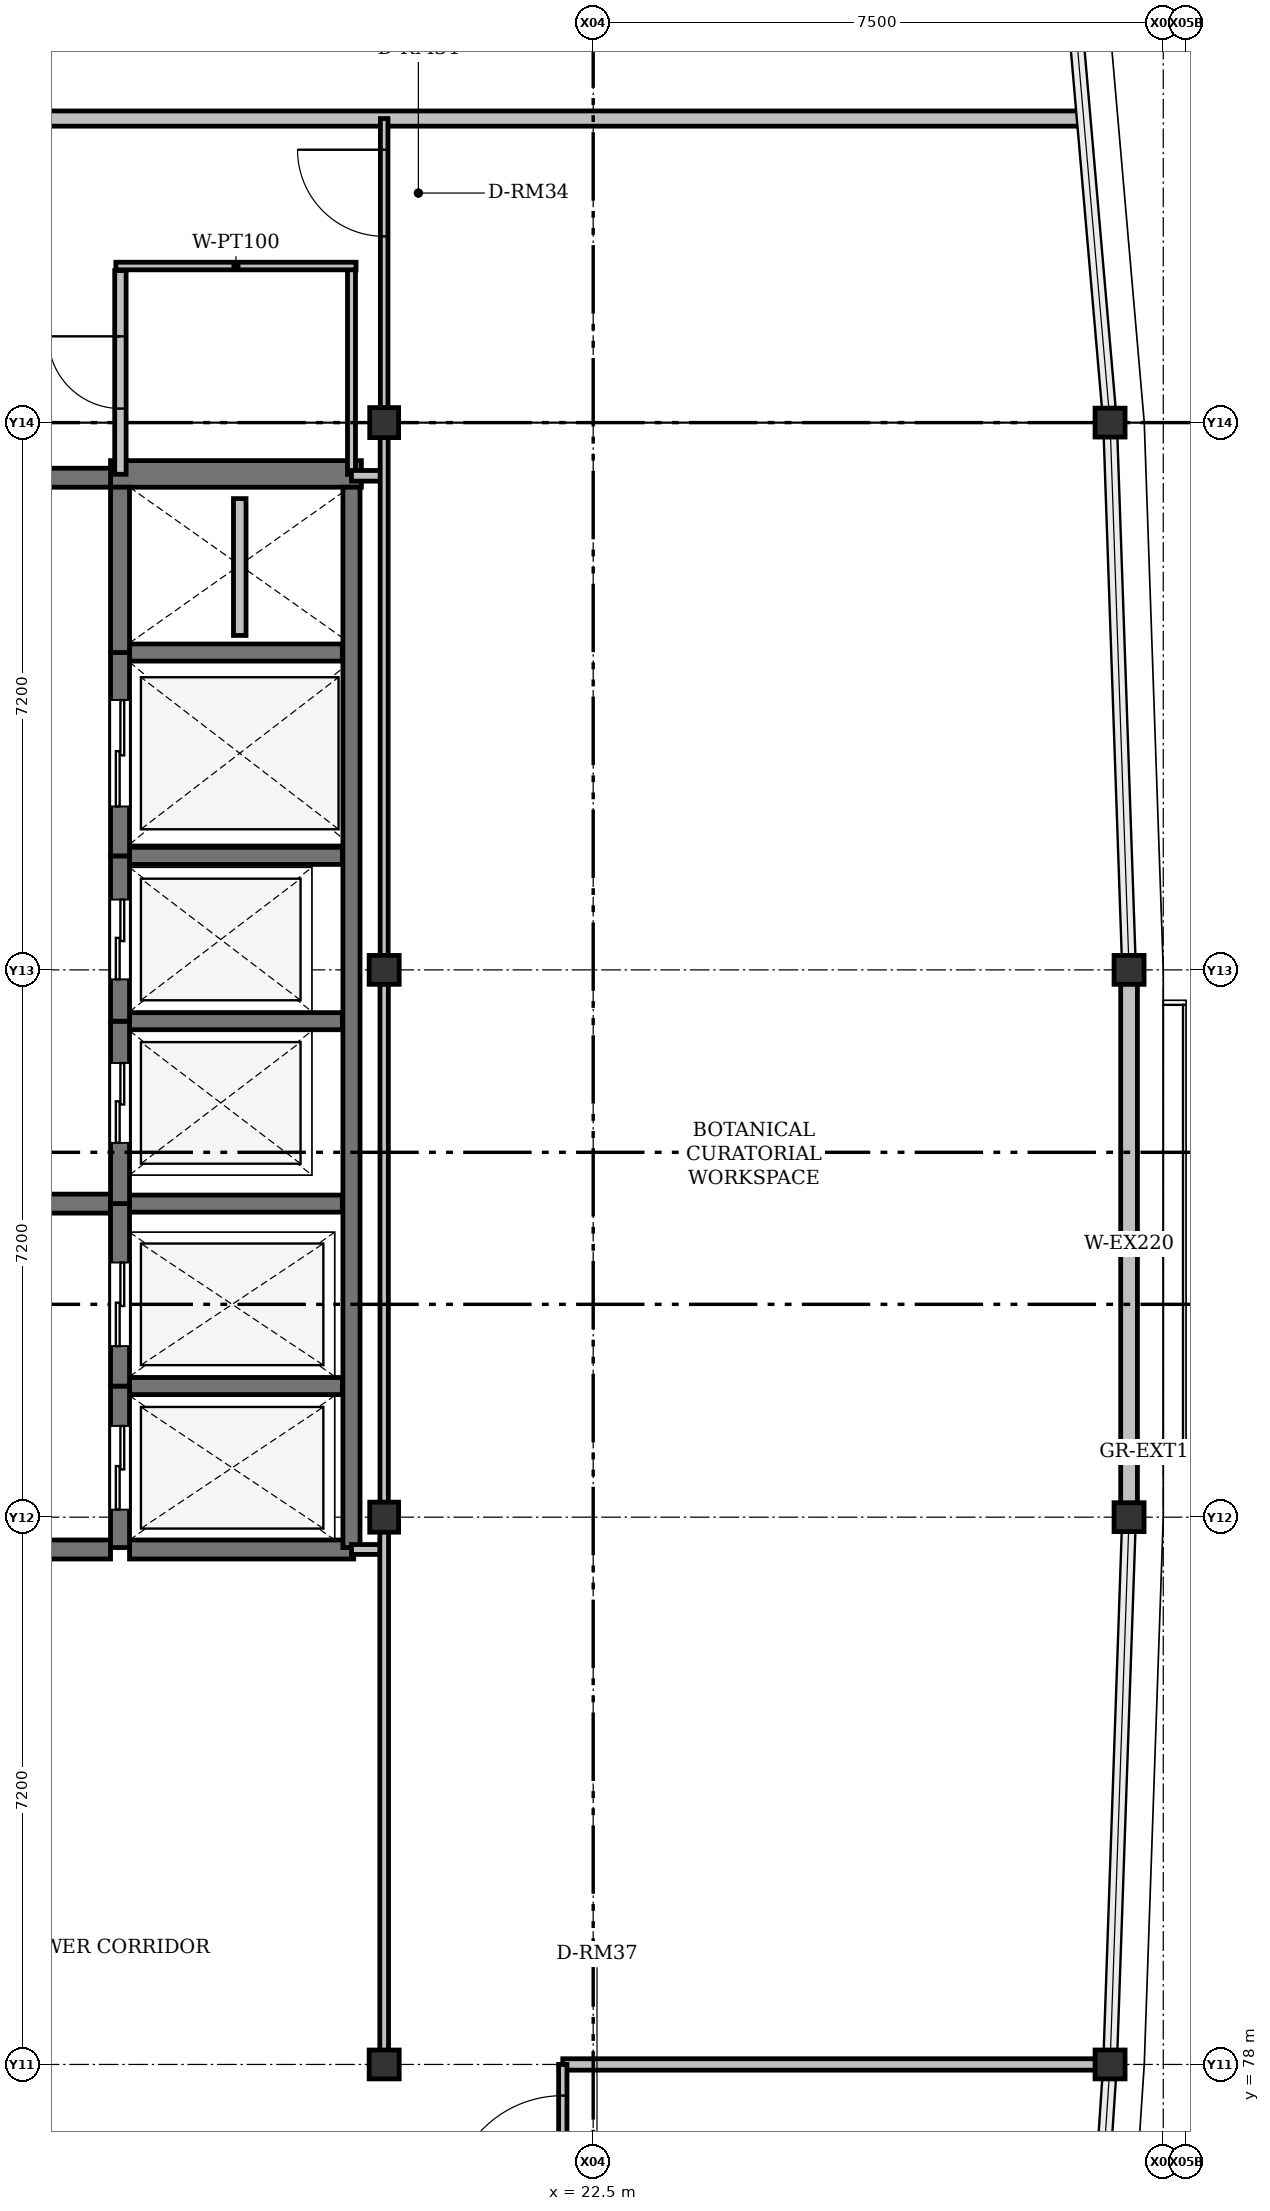
"""IFC4 building model, lengths in metres.
Left out: names, types, materials, properties, quantities, classifications, styles, units other than length and angle.
Written with IfcOpenShell. Run it as: python <this file> out.ifc"""

import sys

from ifc_helpers import new_model, si_unit, direction, frame, frame_2d, origin, origin_2d, place, context, subcontext, project, spatial, rectangle, i_section, extrude, element, fill, save


model = new_model("IFC4")
c1 = context("Model", 3, precision=1e-05, world=origin(), true_north=direction((0.0, 1.0)))
c2 = subcontext(c1, "Body", "Model", "MODEL_VIEW")
j1 = project(units=[si_unit("LENGTHUNIT", "METRE"), si_unit("PLANEANGLEUNIT", "RADIAN")], contexts=[c1])
p1 = place(None, origin())
s1 = spatial("IfcSite", under=j1, at=p1, CompositionType="ELEMENT")
p2 = place(p1, origin())
s2 = spatial("IfcBuilding", under=s1, at=p2, CompositionType="ELEMENT")
p3 = place(p2, frame((0.0, 0.0, 9.9)))
s3 = spatial("IfcBuildingStorey", under=s2, at=p3, CompositionType="ELEMENT", Elevation=9.9)
for number, where, z_axis, x_axis in (
    (1, (19.75, 78.0, 0.0), (0.0, 0.0, 1.0), (1.0, 0.0, 0.0)),
    (2, (29.3, 78.0, 0.0), (0.0, 0.0, 1.0), (1.0, 0.0, 0.0)),
    (3, (19.75, 85.2, 0.0), (0.0, 0.0, 1.0), (0.0, 1.0, 0.0)),
    (4, (29.55, 85.2, 0.0), (0.0, 0.0, 1.0), (1.0, 0.0, 0.0)),
    (5, (19.75, 92.4, 0.0), (0.0, 0.0, 1.0), (1.0, 0.0, 0.0)),
    (6, (29.55, 92.4, 0.0), (0.0, 0.0, 1.0), (1.0, 0.0, 0.0)),
    (7, (19.75, 99.6, 0.0), (0.0, 0.0, 1.0), (0.0, 1.0, 0.0)),
    (8, (29.3, 99.6, 0.0), (0.0, 0.0, 1.0), (1.0, 0.0, 0.0)),
):
    element("IfcColumn", number, at=place(p3, frame(where, z_axis=z_axis, x_axis=x_axis)), inside=s3, PredefinedType="COLUMN", context=c2, shape_type="SweptSolid", body=[
        extrude(i_section(OverallWidth=0.395, OverallDepth=0.38, WebThickness=0.019, FlangeThickness=0.03, FilletRadius=0.015, at=origin_2d()), origin(), (0.0, 0.0, 1.0), 4.2),
    ])
p4 = place(p3, frame((29.55, 92.4, 0.0), z_axis=(0.0, 0.0, 1.0), x_axis=(0.0, -1.0, 0.0)))
e9 = element("IfcWall", 9, at=p4, inside=s3, PredefinedType="SOLIDWALL", context=c2, shape_type="SweptSolid", body=[
    extrude(rectangle(XDim=7.2, YDim=0.22, at=frame_2d((3.6, 0.0))), origin(), (0.0, 0.0, 1.0), 3.592),
])
p5 = place(p3, frame((16.15, 98.925, 0.0), z_axis=(0.0, 0.0, 1.0), x_axis=(1.0, 0.0, 0.0)))
e10 = element("IfcWall", 10, at=p5, inside=s3, PredefinedType="SHEAR", context=c2, shape_type="SweptSolid", body=[
    extrude(rectangle(XDim=3.3, YDim=0.35, at=frame_2d((1.65, 0.0))), origin(), (0.0, 0.0, 1.0), 4.2),
])
p6 = place(p3, frame((12.12, 98.875, 0.0), z_axis=(0.0, 0.0, 1.0), x_axis=(1.0, 0.0, 0.0)))
e11 = element("IfcWall", 11, at=p6, inside=s3, PredefinedType="SHEAR", context=c2, shape_type="SweptSolid", body=[
    extrude(rectangle(XDim=4.03, YDim=0.25, at=frame_2d((2.015, 0.0))), origin(), (0.0, 0.0, 1.0), 4.2),
])
p7 = place(p6, frame((1.35, 0.0, 0.0)))
e12 = element("IfcOpeningElement", 12, at=p7, cuts=e11, PredefinedType="OPENING", context=c2, shape_type="SweptSolid", body=[
    extrude(rectangle(XDim=1.3, YDim=2.2, at=frame_2d((0.65, 1.1))), frame((0.0, 0.125, 0.0), z_axis=(0.0, -1.0, 0.0), x_axis=(1.0, 0.0, 0.0)), (0.0, 0.0, 1.0), 0.25),
])
p8 = place(p3, frame((12.12, 89.325, 0.0), z_axis=(0.0, 0.0, 1.0), x_axis=(1.0, 0.0, 0.0)))
e13 = element("IfcWall", 13, at=p8, inside=s3, PredefinedType="SHEAR", context=c2, shape_type="SweptSolid", body=[
    extrude(rectangle(XDim=4.03, YDim=0.25, at=frame_2d((2.015, 0.0))), origin(), (0.0, 0.0, 1.0), 4.2),
])
p9 = place(p8, frame((1.35, 0.0, 0.0)))
e14 = element("IfcOpeningElement", 14, at=p9, cuts=e13, PredefinedType="OPENING", context=c2, shape_type="SweptSolid", body=[
    extrude(rectangle(XDim=1.3, YDim=2.2, at=frame_2d((0.65, 1.1))), frame((0.0, 0.125, 0.0), z_axis=(0.0, -1.0, 0.0), x_axis=(1.0, 0.0, 0.0)), (0.0, 0.0, 1.0), 0.25),
])
p10 = place(p3, frame((12.12, 84.775, 0.0), z_axis=(0.0, 0.0, 1.0), x_axis=(1.0, 0.0, 0.0)))
e15 = element("IfcWall", 15, at=p10, inside=s3, PredefinedType="SHEAR", context=c2, shape_type="SweptSolid", body=[
    extrude(rectangle(XDim=4.03, YDim=0.25, at=frame_2d((2.015, 0.0))), origin(), (0.0, 0.0, 1.0), 4.2),
])
p11 = place(p10, frame((1.3, 0.0, 0.0)))
e16 = element("IfcOpeningElement", 16, at=p11, cuts=e15, PredefinedType="OPENING", context=c2, shape_type="SweptSolid", body=[
    extrude(rectangle(XDim=1.4, YDim=2.25, at=frame_2d((0.7, 1.125))), frame((0.0, 0.125, 0.0), z_axis=(0.0, -1.0, 0.0), x_axis=(1.0, 0.0, 0.0)), (0.0, 0.0, 1.0), 0.25),
])
p12 = place(p3, frame((16.4, 84.775, 0.0), z_axis=(0.0, 0.0, 1.0), x_axis=(1.0, 0.0, 0.0)))
e17 = element("IfcWall", 17, at=p12, inside=s3, PredefinedType="SHEAR", context=c2, shape_type="SweptSolid", body=[
    extrude(rectangle(XDim=2.95, YDim=0.25, at=frame_2d((1.475, 0.0))), origin(), (0.0, 0.0, 1.0), 4.2),
])
p13 = place(p3, frame((19.32, 84.8, 0.0), z_axis=(0.0, 0.0, 1.0), x_axis=(0.0, 1.0, 0.0)))
e18 = element("IfcWall", 18, at=p13, inside=s3, PredefinedType="SHEAR", context=c2, shape_type="SweptSolid", body=[
    extrude(rectangle(XDim=13.95, YDim=0.225, at=frame_2d((6.975, 0.0))), origin(), (0.0, 0.0, 1.0), 4.2),
])
for number, where, z_axis, x_axis in (
    (19, (16.4, 86.925, 0.0), (0.0, 0.0, 1.0), (1.0, 0.0, 0.0)),
    (20, (16.4, 89.325, 0.0), (0.0, 0.0, 1.0), (1.0, 0.0, 0.0)),
    (21, (16.4, 91.725, 0.0), (0.0, 0.0, 1.0), (1.0, 0.0, 0.0)),
    (22, (16.4, 93.9, 0.0), (0.0, 0.0, 1.0), (1.0, 0.0, 0.0)),
    (23, (16.4, 96.575, 0.0), (0.0, 0.0, 1.0), (1.0, 0.0, 0.0)),
):
    element("IfcWall", number, at=place(p3, frame(where, z_axis=z_axis, x_axis=x_axis)), inside=s3, PredefinedType="SHEAR", context=c2, shape_type="SweptSolid", body=[
        extrude(rectangle(XDim=2.8, YDim=0.225, at=frame_2d((1.4, 0.0))), origin(), (0.0, 0.0, 1.0), 4.2),
    ])
p14 = place(p3, frame((16.275, 84.8, 0.0), z_axis=(0.0, 0.0, 1.0), x_axis=(0.0, 1.0, 0.0)))
e24 = element("IfcWall", 24, at=p14, inside=s3, PredefinedType="SHEAR", context=c2, shape_type="SweptSolid", body=[
    extrude(rectangle(XDim=2.125, YDim=0.25, at=frame_2d((1.062, 0.0))), origin(), (0.0, 0.0, 1.0), 4.2),
])
p15 = place(p14, frame((0.5, 0.0, 0.0)))
e25 = element("IfcOpeningElement", 25, at=p15, cuts=e24, PredefinedType="OPENING", context=c2, shape_type="SweptSolid", body=[
    extrude(rectangle(XDim=1.1, YDim=2.15, at=frame_2d((0.55, 1.075))), frame((0.0, 0.125, 0.0), z_axis=(0.0, -1.0, 0.0), x_axis=(1.0, 0.0, 0.0)), (0.0, 0.0, 1.0), 0.25),
])
p16 = place(p3, frame((16.275, 86.925, 0.0), z_axis=(0.0, 0.0, 1.0), x_axis=(0.0, 1.0, 0.0)))
e26 = element("IfcWall", 26, at=p16, inside=s3, PredefinedType="SHEAR", context=c2, shape_type="SweptSolid", body=[
    extrude(rectangle(XDim=2.4, YDim=0.25, at=frame_2d((1.2, 0.0))), origin(), (0.0, 0.0, 1.0), 4.2),
])
p17 = place(p16, frame((0.525, 0.0, 0.0)))
e27 = element("IfcOpeningElement", 27, at=p17, cuts=e26, PredefinedType="OPENING", context=c2, shape_type="SweptSolid", body=[
    extrude(rectangle(XDim=1.1, YDim=2.15, at=frame_2d((0.55, 1.075))), frame((0.0, 0.125, 0.0), z_axis=(0.0, -1.0, 0.0), x_axis=(1.0, 0.0, 0.0)), (0.0, 0.0, 1.0), 0.25),
])
p18 = place(p3, frame((16.275, 89.325, 0.0), z_axis=(0.0, 0.0, 1.0), x_axis=(0.0, 1.0, 0.0)))
e28 = element("IfcWall", 28, at=p18, inside=s3, PredefinedType="SHEAR", context=c2, shape_type="SweptSolid", body=[
    extrude(rectangle(XDim=2.4, YDim=0.25, at=frame_2d((1.2, 0.0))), origin(), (0.0, 0.0, 1.0), 4.2),
])
p19 = place(p18, frame((0.8, 0.0, 0.0)))
e29 = element("IfcOpeningElement", 29, at=p19, cuts=e28, PredefinedType="OPENING", context=c2, shape_type="SweptSolid", body=[
    extrude(rectangle(XDim=1.05, YDim=2.15, at=frame_2d((0.525, 1.075))), frame((0.0, 0.125, 0.0), z_axis=(0.0, -1.0, 0.0), x_axis=(1.0, 0.0, 0.0)), (0.0, 0.0, 1.0), 0.25),
])
p20 = place(p3, frame((16.275, 91.725, 0.0), z_axis=(0.0, 0.0, 1.0), x_axis=(0.0, 1.0, 0.0)))
e30 = element("IfcWall", 30, at=p20, inside=s3, PredefinedType="SHEAR", context=c2, shape_type="SweptSolid", body=[
    extrude(rectangle(XDim=2.175, YDim=0.25, at=frame_2d((1.087, 0.0))), origin(), (0.0, 0.0, 1.0), 4.2),
])
p21 = place(p20, frame((0.55, 0.0, 0.0)))
e31 = element("IfcOpeningElement", 31, at=p21, cuts=e30, PredefinedType="OPENING", context=c2, shape_type="SweptSolid", body=[
    extrude(rectangle(XDim=1.05, YDim=2.15, at=frame_2d((0.525, 1.075))), frame((0.0, 0.125, 0.0), z_axis=(0.0, -1.0, 0.0), x_axis=(1.0, 0.0, 0.0)), (0.0, 0.0, 1.0), 0.25),
])
p22 = place(p3, frame((16.275, 93.9, 0.0), z_axis=(0.0, 0.0, 1.0), x_axis=(0.0, 1.0, 0.0)))
e32 = element("IfcWall", 32, at=p22, inside=s3, PredefinedType="SHEAR", context=c2, shape_type="SweptSolid", body=[
    extrude(rectangle(XDim=2.675, YDim=0.25, at=frame_2d((1.337, 0.0))), origin(), (0.0, 0.0, 1.0), 4.2),
])
p23 = place(p22, frame((0.65, 0.0, 0.0)))
e33 = element("IfcOpeningElement", 33, at=p23, cuts=e32, PredefinedType="OPENING", context=c2, shape_type="SweptSolid", body=[
    extrude(rectangle(XDim=1.4, YDim=2.25, at=frame_2d((0.7, 1.125))), frame((0.0, 0.125, 0.0), z_axis=(0.0, -1.0, 0.0), x_axis=(1.0, 0.0, 0.0)), (0.0, 0.0, 1.0), 0.25),
])
p24 = place(p3, frame((16.275, 96.575, 0.0), z_axis=(0.0, 0.0, 1.0), x_axis=(0.0, 1.0, 0.0)))
e34 = element("IfcWall", 34, at=p24, inside=s3, PredefinedType="SHEAR", context=c2, shape_type="SweptSolid", body=[
    extrude(rectangle(XDim=2.175, YDim=0.25, at=frame_2d((1.087, 0.0))), origin(), (0.0, 0.0, 1.0), 4.2),
])
p25 = place(p3, frame((17.85, 96.8, 0.0), z_axis=(0.0, 0.0, 1.0), x_axis=(0.0, 1.0, 0.0)))
e35 = element("IfcWall", 35, at=p25, inside=s3, PredefinedType="PLUMBINGWALL", context=c2, shape_type="SweptSolid", body=[
    extrude(rectangle(XDim=1.8, YDim=0.165, at=frame_2d((0.9, 0.0))), origin(), (0.0, 0.0, 1.0), 4.2),
])
p26 = place(p3, frame((19.32, 98.92, 0.0), z_axis=(0.0, 0.0, 1.0), x_axis=(0.0, 1.0, 0.0)))
e36 = element("IfcWall", 36, at=p26, inside=s3, PredefinedType="PARTITIONING", context=c2, shape_type="SweptSolid", body=[
    extrude(rectangle(XDim=2.74, YDim=0.105, at=frame_2d((1.37, 0.0))), origin(), (0.0, 0.0, 1.0), 3.466),
])
p27 = place(p3, frame((19.38, 101.66, 0.0), z_axis=(0.0, 0.0, 1.0), x_axis=(-1.0, 0.0, 0.0)))
e37 = element("IfcWall", 37, at=p27, inside=s3, PredefinedType="PARTITIONING", context=c2, shape_type="SweptSolid", body=[
    extrude(rectangle(XDim=3.16, YDim=0.1, at=frame_2d((1.58, 0.0))), origin(), (0.0, 0.0, 1.0), 3.95),
])
p28 = place(p3, frame((16.28, 98.92, 0.0), z_axis=(0.0, 0.0, 1.0), x_axis=(0.0, 1.0, 0.0)))
e38 = element("IfcWall", 38, at=p28, inside=s3, PredefinedType="PARTITIONING", context=c2, shape_type="SweptSolid", body=[
    extrude(rectangle(XDim=2.68, YDim=0.15, at=frame_2d((1.34, 0.0))), origin(), (0.0, 0.0, 1.0), 3.466),
])
p29 = place(p28, frame((0.865, 0.0, 0.0)))
e39 = element("IfcOpeningElement", 39, at=p29, cuts=e38, PredefinedType="OPENING", context=c2, shape_type="SweptSolid", body=[
    extrude(rectangle(XDim=0.95, YDim=2.2, at=frame_2d((0.475, 1.1))), frame((0.0, 0.075, 0.0), z_axis=(0.0, -1.0, 0.0), x_axis=(1.0, 0.0, 0.0)), (0.0, 0.0, 1.0), 0.15),
])
p30 = place(p3, frame((19.75, 98.9, 0.0), z_axis=(0.0, 0.0, 1.0), x_axis=(-1.0, 0.0, 0.0)))
e40 = element("IfcWall", 40, at=p30, inside=s3, PredefinedType="PARTITIONING", context=c2, shape_type="SweptSolid", body=[
    extrude(rectangle(XDim=0.43, YDim=0.14, at=frame_2d((0.215, 0.0))), origin(), (0.0, 0.0, 1.0), 3.542),
])
p31 = place(p3, frame((19.32, 84.775, 0.0), z_axis=(0.0, 0.0, 1.0), x_axis=(1.0, 0.0, 0.0)))
e41 = element("IfcWall", 41, at=p31, inside=s3, PredefinedType="PARTITIONING", context=c2, shape_type="SweptSolid", body=[
    extrude(rectangle(XDim=0.43, YDim=0.13, at=frame_2d((0.215, 0.0))), origin(), (0.0, 0.0, 1.0), 3.542),
])
p32 = place(p3, frame((7.85, 103.6, 0.0), z_axis=(0.0, 0.0, 1.0), x_axis=(1.0, 0.0, 0.0)))
e42 = element("IfcWall", 42, at=p32, inside=s3, PredefinedType="SOLIDWALL", context=c2, shape_type="SweptSolid", body=[
    extrude(rectangle(XDim=21.065, YDim=0.2, at=frame_2d((10.532, 0.0))), origin(), (0.0, 0.0, 1.0), 3.542),
])
p33 = place(p32, frame((2.075, 0.0, 0.0)))
e43 = element("IfcOpeningElement", 43, at=p33, cuts=e42, PredefinedType="OPENING", context=c2, shape_type="SweptSolid", body=[
    extrude(rectangle(XDim=1.35, YDim=2.25, at=frame_2d((0.675, 1.125))), frame((0.0, 0.1, 0.0), z_axis=(0.0, -1.0, 0.0), x_axis=(1.0, 0.0, 0.0)), (0.0, 0.0, 1.0), 0.2),
])
p34 = place(p3, frame((19.75, 78.185, 0.0), z_axis=(0.0, 0.0, 1.0), x_axis=(0.0, 1.0, 0.0)))
e44 = element("IfcWall", 44, at=p34, inside=s3, PredefinedType="PARTITIONING", context=c2, shape_type="SweptSolid", body=[
    extrude(rectangle(XDim=6.823, YDim=0.115, at=frame_2d((3.411, 0.0))), origin(), (0.0, 0.0, 1.0), 3.542),
])
p35 = place(p3, frame((19.75, 85.393, 0.0), z_axis=(0.0, 0.0, 1.0), x_axis=(0.0, 1.0, 0.0)))
e45 = element("IfcWall", 45, at=p35, inside=s3, PredefinedType="PARTITIONING", context=c2, shape_type="SweptSolid", body=[
    extrude(rectangle(XDim=6.823, YDim=0.11, at=frame_2d((3.411, 0.0))), origin(), (0.0, 0.0, 1.0), 3.542),
])
p36 = place(p3, frame((19.75, 92.585, 0.0), z_axis=(0.0, 0.0, 1.0), x_axis=(0.0, 1.0, 0.0)))
e46 = element("IfcWall", 46, at=p36, inside=s3, PredefinedType="PARTITIONING", context=c2, shape_type="SweptSolid", body=[
    extrude(rectangle(XDim=6.823, YDim=0.105, at=frame_2d((3.411, 0.0))), origin(), (0.0, 0.0, 1.0), 3.542),
])
p37 = place(p3, frame((19.75, 99.792, 0.0), z_axis=(0.0, 0.0, 1.0), x_axis=(0.0, 1.0, 0.0)))
e47 = element("IfcWall", 47, at=p37, inside=s3, PredefinedType="PARTITIONING", context=c2, shape_type="SweptSolid", body=[
    extrude(rectangle(XDim=3.808, YDim=0.1, at=frame_2d((1.904, 0.0))), origin(), (0.0, 0.0, 1.0), 3.542),
])
p38 = place(p37, frame((2.258, 0.0, 0.0)))
e48 = element("IfcOpeningElement", 48, at=p38, cuts=e47, PredefinedType="OPENING", context=c2, shape_type="SweptSolid", body=[
    extrude(rectangle(XDim=1.14, YDim=2.18, at=frame_2d((0.57, 1.09))), frame((0.0, 0.05, 0.0), z_axis=(0.0, -1.0, 0.0), x_axis=(1.0, 0.0, 0.0)), (0.0, 0.0, 1.0), 0.1),
])
p39 = place(p3, frame((22.1, 78.0, 0.0), z_axis=(0.0, 0.0, 1.0), x_axis=(1.0, 0.0, 0.0)))
e49 = element("IfcWall", 49, at=p39, inside=s3, PredefinedType="PARTITIONING", context=c2, shape_type="SweptSolid", body=[
    extrude(rectangle(XDim=7.007, YDim=0.15, at=frame_2d((3.504, 0.0))), origin(), (0.0, 0.0, 1.0), 3.466),
])
p40 = place(p3, frame((22.1, 63.207, 0.0), z_axis=(0.0, 0.0, 1.0), x_axis=(0.0, 1.0, 0.0)))
e50 = element("IfcWall", 50, at=p40, inside=s3, PredefinedType="PARTITIONING", context=c2, shape_type="SweptSolid", body=[
    extrude(rectangle(XDim=14.793, YDim=0.11, at=frame_2d((7.397, 0.0))), origin(), (0.0, 0.0, 1.0), 3.466),
])
p41 = place(p40, frame((12.904, 0.0, 0.0)))
e51 = element("IfcOpeningElement", 51, at=p41, cuts=e50, PredefinedType="OPENING", context=c2, shape_type="SweptSolid", body=[
    extrude(rectangle(XDim=1.48, YDim=2.28, at=frame_2d((0.74, 1.14))), frame((0.0, 0.055, 0.0), z_axis=(0.0, -1.0, 0.0), x_axis=(1.0, 0.0, 0.0)), (0.0, 0.0, 1.0), 0.11),
])
p42 = place(p15, origin())
e52 = element("IfcDoor", 52, at=p42, inside=s3, OperationType="SLIDING_TO_LEFT", PredefinedType="DOOR", context=c2, shape_type="SweptSolid", body=[
    extrude(rectangle(XDim=1.1, YDim=2.15, at=frame_2d((0.55, 1.075))), frame((0.0, 0.025, 0.0), z_axis=(0.0, -1.0, 0.0), x_axis=(1.0, 0.0, 0.0)), (0.0, 0.0, 1.0), 0.05),
])
fill(e25, e52)
p43 = place(p17, origin())
e53 = element("IfcDoor", 53, at=p43, inside=s3, OperationType="SLIDING_TO_LEFT", PredefinedType="DOOR", context=c2, shape_type="SweptSolid", body=[
    extrude(rectangle(XDim=1.1, YDim=2.15, at=frame_2d((0.55, 1.075))), frame((0.0, 0.025, 0.0), z_axis=(0.0, -1.0, 0.0), x_axis=(1.0, 0.0, 0.0)), (0.0, 0.0, 1.0), 0.05),
])
fill(e27, e53)
p44 = place(p19, origin())
e54 = element("IfcDoor", 54, at=p44, inside=s3, OperationType="SLIDING_TO_LEFT", PredefinedType="DOOR", context=c2, shape_type="SweptSolid", body=[
    extrude(rectangle(XDim=1.05, YDim=2.15, at=frame_2d((0.525, 1.075))), frame((0.0, 0.025, 0.0), z_axis=(0.0, -1.0, 0.0), x_axis=(1.0, 0.0, 0.0)), (0.0, 0.0, 1.0), 0.05),
])
fill(e29, e54)
p45 = place(p21, origin())
e55 = element("IfcDoor", 55, at=p45, inside=s3, OperationType="SLIDING_TO_LEFT", PredefinedType="DOOR", context=c2, shape_type="SweptSolid", body=[
    extrude(rectangle(XDim=1.05, YDim=2.15, at=frame_2d((0.525, 1.075))), frame((0.0, 0.025, 0.0), z_axis=(0.0, -1.0, 0.0), x_axis=(1.0, 0.0, 0.0)), (0.0, 0.0, 1.0), 0.05),
])
fill(e31, e55)
p46 = place(p23, origin())
e56 = element("IfcDoor", 56, at=p46, inside=s3, OperationType="SLIDING_TO_LEFT", PredefinedType="DOOR", context=c2, shape_type="SweptSolid", body=[
    extrude(rectangle(XDim=1.4, YDim=2.25, at=frame_2d((0.7, 1.125))), frame((0.0, 0.025, 0.0), z_axis=(0.0, -1.0, 0.0), x_axis=(1.0, 0.0, 0.0)), (0.0, 0.0, 1.0), 0.05),
])
fill(e33, e56)
p47 = place(p29, origin())
e57 = element("IfcDoor", 57, at=p47, inside=s3, OperationType="SINGLE_SWING_RIGHT", PredefinedType="DOOR", context=c2, shape_type="SweptSolid", body=[
    extrude(rectangle(XDim=0.95, YDim=2.2, at=frame_2d((0.475, 1.1))), frame((0.0, 0.025, 0.0), z_axis=(0.0, -1.0, 0.0), x_axis=(1.0, 0.0, 0.0)), (0.0, 0.0, 1.0), 0.05),
])
fill(e39, e57)
p48 = place(p38, origin())
e58 = element("IfcDoor", 58, at=p48, inside=s3, OperationType="SINGLE_SWING_RIGHT", PredefinedType="DOOR", context=c2, shape_type="SweptSolid", body=[
    extrude(rectangle(XDim=1.14, YDim=2.18, at=frame_2d((0.57, 1.09))), frame((0.0, 0.025, 0.0), z_axis=(0.0, -1.0, 0.0), x_axis=(1.0, 0.0, 0.0)), (0.0, 0.0, 1.0), 0.05),
])
fill(e48, e58)
p49 = place(p41, origin())
e59 = element("IfcDoor", 59, at=p49, inside=s3, OperationType="SINGLE_SWING_LEFT", PredefinedType="DOOR", context=c2, shape_type="SweptSolid", body=[
    extrude(rectangle(XDim=1.48, YDim=2.28, at=frame_2d((0.74, 1.14))), frame((0.0, 0.025, 0.0), z_axis=(0.0, -1.0, 0.0), x_axis=(1.0, 0.0, 0.0)), (0.0, 0.0, 1.0), 0.05),
])
fill(e51, e59)
save(model, sys.argv[1])
